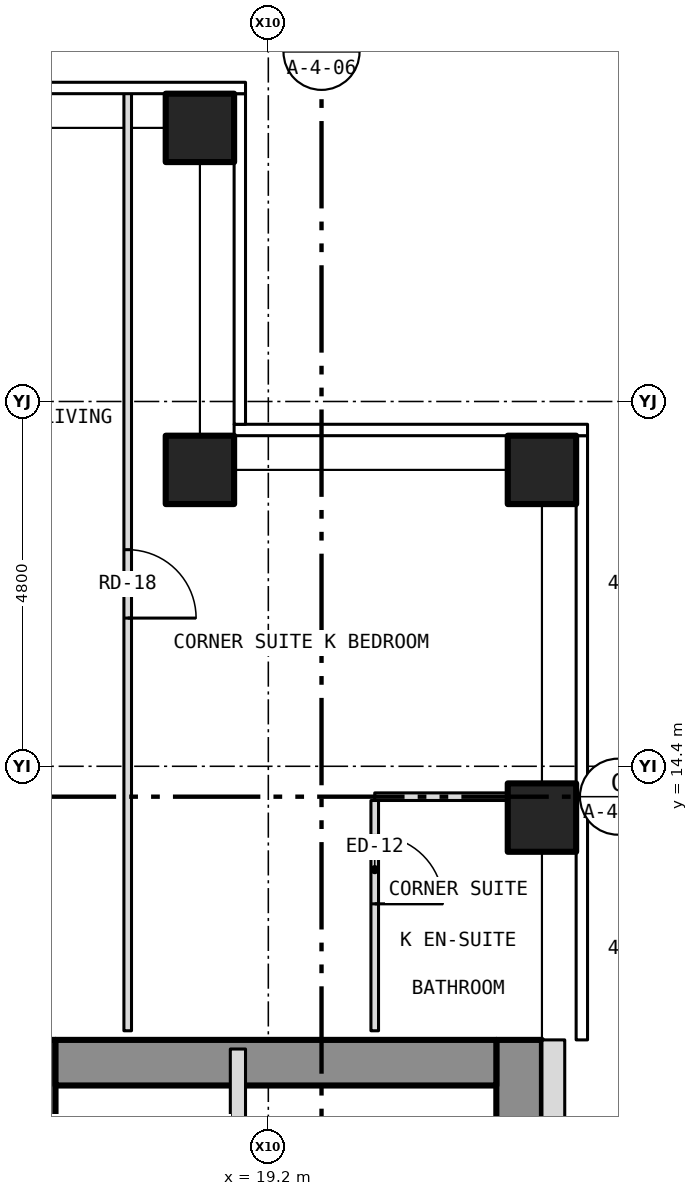
"""IFC4 building model, lengths in metres.
Left out: names, types, materials, properties, quantities, classifications, styles, units other than length and angle.
Written with IfcOpenShell. Run it as: python <this file> out.ifc"""

import sys

from ifc_helpers import new_model, si_unit, direction, frame, frame_2d, origin, origin_2d, place, context, subcontext, project, spatial, rectangle, hollow_rectangle, extrude, element, fill, save


model = new_model("IFC4")
c1 = context("Model", 3, precision=1e-05, world=origin(), true_north=direction((0.0, 1.0)))
c2 = subcontext(c1, "Body", "Model", "MODEL_VIEW")
j1 = project(units=[si_unit("LENGTHUNIT", "METRE"), si_unit("PLANEANGLEUNIT", "RADIAN")], contexts=[c1])
p1 = place(None, origin())
s1 = spatial("IfcSite", under=j1, at=p1, CompositionType="ELEMENT")
p2 = place(p1, origin())
s2 = spatial("IfcBuilding", under=s1, at=p2, CompositionType="ELEMENT")
p3 = place(p2, frame((0.0, 0.0, 106.5)))
s3 = spatial("IfcBuildingStorey", under=s2, at=p3, CompositionType="ELEMENT", Elevation=106.5)
for number, where, z_axis, x_axis in (
    (1, (18.3, 22.8, -0.15), (0.0, 0.0, 1.0), (1.0, 0.0, 0.0)),
    (2, (22.8, 13.725, -0.15), (0.0, 0.0, 1.0), (1.0, 0.0, 0.0)),
    (3, (22.8, 18.3, -0.15), (0.0, 0.0, 1.0), (1.0, 0.0, 0.0)),
    (4, (18.3, 18.3, -0.15), (0.0, 0.0, 1.0), (1.0, 0.0, 0.0)),
):
    element("IfcColumn", number, at=place(p3, frame(where, z_axis=z_axis, x_axis=x_axis)), inside=s3, PredefinedType="COLUMN", context=c2, shape_type="SweptSolid", body=[
        extrude(hollow_rectangle(XDim=0.9, YDim=0.9, WallThickness=0.05, at=origin_2d()), origin(), (0.0, 0.0, 1.0), 3.5),
    ])
p4 = place(p3, frame((16.1, -10.8, 0.0), z_axis=(0.0, 0.0, 1.0), x_axis=(0.0, 1.0, 0.0)))
e5 = element("IfcWall", 5, at=p4, inside=s3, PredefinedType="SHEAR", context=c2, shape_type="SweptSolid", body=[
    extrude(rectangle(XDim=21.6, YDim=0.6, at=frame_2d((10.8, 0.0))), origin(), (0.0, 0.0, 1.0), 3.25),
])
p5 = place(p4, frame((9.4, 0.0, 0.0)))
e6 = element("IfcOpeningElement", 6, at=p5, cuts=e5, PredefinedType="OPENING", context=c2, shape_type="SweptSolid", body=[
    extrude(rectangle(XDim=1.1, YDim=2.1, at=frame_2d((0.55, 1.05))), frame((0.0, 0.312, 0.0), z_axis=(0.0, -1.0, 0.0), x_axis=(1.0, 0.0, 0.0)), (0.0, 0.0, 1.0), 0.624),
])
p6 = place(p4, frame((11.5, 0.0, 0.0)))
e7 = element("IfcOpeningElement", 7, at=p6, cuts=e5, PredefinedType="OPENING", context=c2, shape_type="SweptSolid", body=[
    extrude(rectangle(XDim=1.1, YDim=2.1, at=frame_2d((0.55, 1.05))), frame((0.0, 0.312, 0.0), z_axis=(0.0, -1.0, 0.0), x_axis=(1.0, 0.0, 0.0)), (0.0, 0.0, 1.0), 0.624),
])
p7 = place(p4, frame((13.6, 0.0, 0.0)))
e8 = element("IfcOpeningElement", 8, at=p7, cuts=e5, PredefinedType="OPENING", context=c2, shape_type="SweptSolid", body=[
    extrude(rectangle(XDim=1.1, YDim=2.1, at=frame_2d((0.55, 1.05))), frame((0.0, 0.312, 0.0), z_axis=(0.0, -1.0, 0.0), x_axis=(1.0, 0.0, 0.0)), (0.0, 0.0, 1.0), 0.624),
])
p8 = place(p4, frame((15.7, 0.0, 0.0)))
e9 = element("IfcOpeningElement", 9, at=p8, cuts=e5, PredefinedType="OPENING", context=c2, shape_type="SweptSolid", body=[
    extrude(rectangle(XDim=1.1, YDim=2.1, at=frame_2d((0.55, 1.05))), frame((0.0, 0.312, 0.0), z_axis=(0.0, -1.0, 0.0), x_axis=(1.0, 0.0, 0.0)), (0.0, 0.0, 1.0), 0.624),
])
p9 = place(p4, frame((17.8, 0.0, 0.0)))
e10 = element("IfcOpeningElement", 10, at=p9, cuts=e5, PredefinedType="OPENING", context=c2, shape_type="SweptSolid", body=[
    extrude(rectangle(XDim=1.1, YDim=2.1, at=frame_2d((0.55, 1.05))), frame((0.0, 0.312, 0.0), z_axis=(0.0, -1.0, 0.0), x_axis=(1.0, 0.0, 0.0)), (0.0, 0.0, 1.0), 0.624),
])
p10 = place(p4, frame((5.642, 0.0, 0.0)))
e11 = element("IfcOpeningElement", 11, at=p10, cuts=e5, PredefinedType="OPENING", context=c2, shape_type="SweptSolid", body=[
    extrude(rectangle(XDim=1.1, YDim=2.1, at=frame_2d((0.55, 1.05))), frame((0.0, 0.312, 0.0), z_axis=(0.0, -1.0, 0.0), x_axis=(1.0, 0.0, 0.0)), (0.0, 0.0, 1.0), 0.624),
])
p11 = place(p4, frame((7.5, 0.0, 0.0)))
e12 = element("IfcOpeningElement", 12, at=p11, cuts=e5, PredefinedType="OPENING", context=c2, shape_type="SweptSolid", body=[
    extrude(rectangle(XDim=1.1, YDim=2.1, at=frame_2d((0.55, 1.05))), frame((0.0, 0.312, 0.0), z_axis=(0.0, -1.0, 0.0), x_axis=(1.0, 0.0, 0.0)), (0.0, 0.0, 1.0), 0.624),
])
p12 = place(p3, frame((22.5, -10.8, 0.0), z_axis=(0.0, 0.0, 1.0), x_axis=(0.0, 1.0, 0.0)))
e13 = element("IfcWall", 13, at=p12, inside=s3, PredefinedType="SHEAR", context=c2, shape_type="SweptSolid", body=[
    extrude(rectangle(XDim=21.6, YDim=0.6, at=frame_2d((10.8, 0.0))), origin(), (0.0, 0.0, 1.0), 3.25),
])
p13 = place(p3, frame((16.4, 10.5, 0.0), z_axis=(0.0, 0.0, 1.0), x_axis=(1.0, 0.0, 0.0)))
e14 = element("IfcWall", 14, at=p13, inside=s3, PredefinedType="SHEAR", context=c2, shape_type="SweptSolid", body=[
    extrude(rectangle(XDim=5.8, YDim=0.6, at=frame_2d((2.9, 0.0))), origin(), (0.0, 0.0, 1.0), 3.25),
])
p14 = place(p3, frame((22.95, -10.8, 0.0), z_axis=(0.0, 0.0, 1.0), x_axis=(0.0, 1.0, 0.0)))
e15 = element("IfcWall", 15, at=p14, inside=s3, PredefinedType="SOLIDWALL", context=c2, shape_type="SweptSolid", body=[
    extrude(rectangle(XDim=21.6, YDim=0.3, at=frame_2d((10.8, 0.0))), origin(), (0.0, 0.0, 1.0), 3.5),
])
p15 = place(p14, frame((2.95, 0.0, 1.0)))
e16 = element("IfcOpeningElement", 16, at=p15, cuts=e15, PredefinedType="OPENING", context=c2, shape_type="SweptSolid", body=[
    extrude(rectangle(XDim=0.6, YDim=1.5, at=frame_2d((0.3, 0.75))), frame((0.0, 0.162, 0.0), z_axis=(0.0, -1.0, 0.0), x_axis=(1.0, 0.0, 0.0)), (0.0, 0.0, 1.0), 0.324),
])
p16 = place(p3, frame((20.6, 14.0, 0.0), z_axis=(0.0, 0.0, 1.0), x_axis=(1.0, 0.0, 0.0)))
e17 = element("IfcWall", 17, at=p16, inside=s3, PredefinedType="PARTITIONING", context=c2, shape_type="SweptSolid", body=[
    extrude(rectangle(XDim=2.08, YDim=0.1, at=frame_2d((1.04, 0.0))), origin(), (0.0, 0.0, 1.0), 3.35),
])
p17 = place(p3, frame((17.35, 10.92, 0.0), z_axis=(0.0, 0.0, 1.0), x_axis=(0.0, 1.0, 0.0)))
e18 = element("IfcWall", 18, at=p17, inside=s3, PredefinedType="PARTITIONING", context=c2, shape_type="SweptSolid", body=[
    extrude(rectangle(XDim=12.36, YDim=0.1, at=frame_2d((6.18, 0.0))), origin(), (0.0, 0.0, 1.0), 3.35),
])
p18 = place(p17, frame((5.43, 0.0, 0.0)))
e19 = element("IfcOpeningElement", 19, at=p18, cuts=e18, PredefinedType="OPENING", context=c2, shape_type="SweptSolid", body=[
    extrude(rectangle(XDim=0.9, YDim=2.1, at=frame_2d((0.45, 1.05))), frame((0.0, 0.062, 0.0), z_axis=(0.0, -1.0, 0.0), x_axis=(1.0, 0.0, 0.0)), (0.0, 0.0, 1.0), 0.124),
])
p19 = place(p3, frame((18.8, -1.8, 0.0), z_axis=(0.0, 0.0, 1.0), x_axis=(0.0, 1.0, 0.0)))
e20 = element("IfcWall", 20, at=p19, inside=s3, PredefinedType="PARTITIONING", context=c2, shape_type="SweptSolid", body=[
    extrude(rectangle(XDim=12.48, YDim=0.2, at=frame_2d((6.24, 0.0))), origin(), (0.0, 0.0, 1.0), 3.25),
])
p20 = place(p3, frame((20.6, 10.92, 0.0), z_axis=(0.0, 0.0, 1.0), x_axis=(0.0, 1.0, 0.0)))
e21 = element("IfcWall", 21, at=p20, inside=s3, PredefinedType="PARTITIONING", context=c2, shape_type="SweptSolid", body=[
    extrude(rectangle(XDim=3.03, YDim=0.1, at=frame_2d((1.515, 0.0))), origin(), (0.0, 0.0, 1.0), 3.35),
])
p21 = place(p20, frame((1.67, 0.0, 0.0)))
e22 = element("IfcOpeningElement", 22, at=p21, cuts=e21, PredefinedType="OPENING", context=c2, shape_type="SweptSolid", body=[
    extrude(rectangle(XDim=0.9, YDim=2.1, at=frame_2d((0.45, 1.05))), frame((0.0, 0.062, 0.0), z_axis=(0.0, -1.0, 0.0), x_axis=(1.0, 0.0, 0.0)), (0.0, 0.0, 1.0), 0.124),
])
p22 = place(p18, origin())
e23 = element("IfcDoor", 23, at=p22, inside=s3, OperationType="SINGLE_SWING_LEFT", PredefinedType="DOOR", context=c2, shape_type="SweptSolid", body=[
    extrude(rectangle(XDim=0.9, YDim=2.1, at=frame_2d((0.45, 1.05))), frame((0.0, 0.025, 0.0), z_axis=(0.0, -1.0, 0.0), x_axis=(1.0, 0.0, 0.0)), (0.0, 0.0, 1.0), 0.05),
])
fill(e19, e23)
p23 = place(p21, origin())
e24 = element("IfcDoor", 24, at=p23, inside=s3, OperationType="SINGLE_SWING_LEFT", PredefinedType="DOOR", context=c2, shape_type="SweptSolid", body=[
    extrude(rectangle(XDim=0.9, YDim=2.1, at=frame_2d((0.45, 1.05))), frame((0.0, 0.025, 0.0), z_axis=(0.0, -1.0, 0.0), x_axis=(1.0, 0.0, 0.0)), (0.0, 0.0, 1.0), 0.05),
])
fill(e22, e24)
save(model, sys.argv[1])
